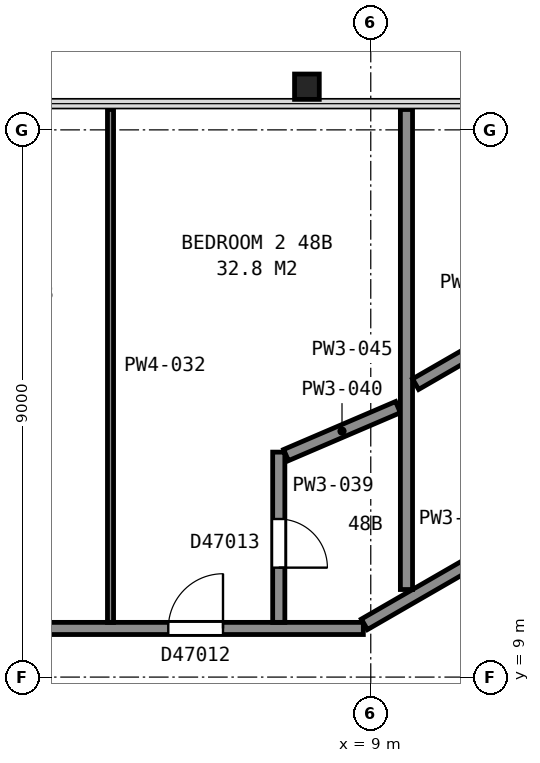
"""IFC4 building model, lengths in metres.
Left out: names, types, materials, properties, quantities, classifications, styles, units other than length and angle.
Written with IfcOpenShell. Run it as: python <this file> out.ifc"""

import sys

from ifc_helpers import new_model, si_unit, direction, frame, frame_2d, origin, origin_2d, place, context, subcontext, project, spatial, rectangle, i_section, extrude, element, fill, save


model = new_model("IFC4")
c1 = context("Model", 3, precision=1e-05, world=origin(), true_north=direction((0.0, 1.0)))
c2 = subcontext(c1, "Body", "Model", "MODEL_VIEW")
j1 = project(units=[si_unit("LENGTHUNIT", "METRE"), si_unit("PLANEANGLEUNIT", "RADIAN")], contexts=[c1])
p1 = place(None, origin())
s1 = spatial("IfcSite", under=j1, at=p1, CompositionType="ELEMENT")
p2 = place(p1, origin())
s2 = spatial("IfcBuilding", under=s1, at=p2, CompositionType="ELEMENT")
p3 = place(p2, frame((0.0, 0.0, 193.2)))
s3 = spatial("IfcBuildingStorey", under=s2, at=p3, CompositionType="ELEMENT", Elevation=193.2)
p4 = place(p3, frame((7.95, 18.71, 0.0), z_axis=(0.0, 0.0, 1.0), x_axis=(1.0, 0.0, 0.0)))
e1 = element("IfcColumn", 1, at=p4, inside=s3, PredefinedType="COLUMN", context=c2, shape_type="SweptSolid", body=[
    extrude(i_section(OverallWidth=0.406, OverallDepth=0.417, WebThickness=0.03, FlangeThickness=0.048, FilletRadius=0.015, at=origin_2d()), origin(), (0.0, 0.0, 1.0), 3.7),
])
p5 = place(p3, frame((6.178, 5.299, 0.0), z_axis=(0.0, 0.0, 1.0), x_axis=(0.866019993635, 0.500009370536, 0.0)))
e2 = element("IfcWall", 2, at=p5, inside=s3, PredefinedType="PARTITIONING", context=c2, shape_type="SweptSolid", body=[
    extrude(rectangle(XDim=9.6, YDim=0.2, at=frame_2d((4.8, 0.0))), origin(), (0.0, 0.0, 1.0), 3.45),
])
p6 = place(p3, frame((-8.828, 9.8, 0.0), z_axis=(0.0, 0.0, 1.0), x_axis=(1.0, 0.0, 0.0)))
e3 = element("IfcWall", 3, at=p6, inside=s3, PredefinedType="PARTITIONING", context=c2, shape_type="SweptSolid", body=[
    extrude(rectangle(XDim=17.706, YDim=0.2, at=frame_2d((8.853, 0.0))), origin(), (0.0, 0.0, 1.0), 2.713),
])
p7 = place(p6, frame((14.498, 0.0, 0.0)))
e4 = element("IfcOpeningElement", 4, at=p7, cuts=e3, PredefinedType="OPENING", context=c2, shape_type="SweptSolid", body=[
    extrude(rectangle(XDim=0.9, YDim=2.1, at=frame_2d((0.45, 1.05))), frame((0.0, 0.11, 0.0), z_axis=(0.0, -1.0, 0.0), x_axis=(1.0, 0.0, 0.0)), (0.0, 0.0, 1.0), 0.22),
])
p8 = place(p6, frame((10.919, 0.0, 0.0)))
e5 = element("IfcOpeningElement", 5, at=p8, cuts=e3, PredefinedType="OPENING", context=c2, shape_type="SweptSolid", body=[
    extrude(rectangle(XDim=0.9, YDim=2.1, at=frame_2d((0.45, 1.05))), frame((0.0, 0.11, 0.0), z_axis=(0.0, -1.0, 0.0), x_axis=(1.0, 0.0, 0.0)), (0.0, 0.0, 1.0), 0.22),
])
p9 = place(p6, frame((6.113, 0.0, 0.0)))
e6 = element("IfcOpeningElement", 6, at=p9, cuts=e3, PredefinedType="OPENING", context=c2, shape_type="SweptSolid", body=[
    extrude(rectangle(XDim=0.9, YDim=2.1, at=frame_2d((0.45, 1.05))), frame((0.0, 0.11, 0.0), z_axis=(0.0, -1.0, 0.0), x_axis=(1.0, 0.0, 0.0)), (0.0, 0.0, 1.0), 0.22),
])
p10 = place(p3, frame((4.72, 9.9, 0.0), z_axis=(0.0, 0.0, 1.0), x_axis=(0.0, 1.0, 0.0)))
e7 = element("IfcWall", 7, at=p10, inside=s3, PredefinedType="PARTITIONING", context=c2, shape_type="SweptSolid", body=[
    extrude(rectangle(XDim=8.435, YDim=0.1, at=frame_2d((4.218, 0.0))), origin(), (0.0, 0.0, 1.0), 2.713),
])
p11 = place(p3, frame((7.487, 12.7, 0.0), z_axis=(0.0, 0.0, 1.0), x_axis=(0.0, -1.0, 0.0)))
e8 = element("IfcWall", 8, at=p11, inside=s3, PredefinedType="PARTITIONING", context=c2, shape_type="SweptSolid", body=[
    extrude(rectangle(XDim=2.8, YDim=0.2, at=frame_2d((1.4, 0.0))), origin(), (0.0, 0.0, 1.0), 2.713),
])
p12 = place(p11, frame((1.1, 0.0, 0.0)))
e9 = element("IfcOpeningElement", 9, at=p12, cuts=e8, PredefinedType="OPENING", context=c2, shape_type="SweptSolid", body=[
    extrude(rectangle(XDim=0.8, YDim=2.1, at=frame_2d((0.4, 1.05))), frame((0.0, 0.11, 0.0), z_axis=(0.0, -1.0, 0.0), x_axis=(1.0, 0.0, 0.0)), (0.0, 0.0, 1.0), 0.22),
])
p13 = place(p3, frame((7.606, 12.651, 0.0), z_axis=(0.0, 0.0, 1.0), x_axis=(0.919138725477, 0.39393400885, 0.0)))
e10 = element("IfcWall", 10, at=p13, inside=s3, PredefinedType="PARTITIONING", context=c2, shape_type="SweptSolid", body=[
    extrude(rectangle(XDim=2.003, YDim=0.2, at=frame_2d((1.001, 0.0))), origin(), (0.0, 0.0, 1.0), 2.713),
])
p14 = place(p3, frame((8.895, 9.867, 0.0), z_axis=(0.0, 0.0, 1.0), x_axis=(0.866079355551, 0.499906541154, 0.0)))
e11 = element("IfcWall", 11, at=p14, inside=s3, PredefinedType="PARTITIONING", context=c2, shape_type="SweptSolid", body=[
    extrude(rectangle(XDim=8.113, YDim=0.2, at=frame_2d((4.056, 0.0))), origin(), (0.0, 0.0, 1.0), 2.713),
])
p15 = place(p14, frame((5.201, 0.0, 0.0)))
e12 = element("IfcOpeningElement", 12, at=p15, cuts=e11, PredefinedType="OPENING", context=c2, shape_type="SweptSolid", body=[
    extrude(rectangle(XDim=0.9, YDim=2.1, at=frame_2d((0.45, 1.05))), frame((0.0, 0.11, 0.0), z_axis=(0.0, -1.0, 0.0), x_axis=(1.0, 0.0, 0.0)), (0.0, 0.0, 1.0), 0.22),
])
p16 = place(p3, frame((9.587, 10.44, 0.0), z_axis=(0.0, 0.0, 1.0), x_axis=(0.0, 1.0, 0.0)))
e13 = element("IfcWall", 13, at=p16, inside=s3, PredefinedType="PARTITIONING", context=c2, shape_type="SweptSolid", body=[
    extrude(rectangle(XDim=7.895, YDim=0.2, at=frame_2d((3.947, 0.0))), origin(), (0.0, 0.0, 1.0), 2.713),
])
p17 = place(p3, frame((12.04, 15.146, 0.0), z_axis=(0.0, 0.0, 1.0), x_axis=(-0.866206990114, -0.499685351273, 0.0)))
e14 = element("IfcWall", 14, at=p17, inside=s3, PredefinedType="PARTITIONING", context=c2, shape_type="SweptSolid", body=[
    extrude(rectangle(XDim=2.658, YDim=0.2, at=frame_2d((1.329, 0.0))), origin(), (0.0, 0.0, 1.0), 2.713),
])
p18 = place(p17, frame((0.932, 0.0, 0.0)))
e15 = element("IfcOpeningElement", 15, at=p18, cuts=e14, PredefinedType="OPENING", context=c2, shape_type="SweptSolid", body=[
    extrude(rectangle(XDim=0.8, YDim=2.1, at=frame_2d((0.4, 1.05))), frame((0.0, 0.11, 0.0), z_axis=(0.0, -1.0, 0.0), x_axis=(1.0, 0.0, 0.0)), (0.0, 0.0, 1.0), 0.22),
])
p19 = place(p7, origin())
e16 = element("IfcDoor", 16, at=p19, inside=s3, OperationType="SINGLE_SWING_RIGHT", PredefinedType="DOOR", context=c2, shape_type="SweptSolid", body=[
    extrude(rectangle(XDim=0.9, YDim=2.1, at=frame_2d((0.45, 1.05))), frame((0.0, 0.025, 0.0), z_axis=(0.0, -1.0, 0.0), x_axis=(1.0, 0.0, 0.0)), (0.0, 0.0, 1.0), 0.05),
])
fill(e4, e16)
p20 = place(p12, origin())
e17 = element("IfcDoor", 17, at=p20, inside=s3, OperationType="SINGLE_SWING_RIGHT", PredefinedType="DOOR", context=c2, shape_type="SweptSolid", body=[
    extrude(rectangle(XDim=0.8, YDim=2.1, at=frame_2d((0.4, 1.05))), frame((0.0, 0.025, 0.0), z_axis=(0.0, -1.0, 0.0), x_axis=(1.0, 0.0, 0.0)), (0.0, 0.0, 1.0), 0.05),
])
fill(e9, e17)
save(model, sys.argv[1])
